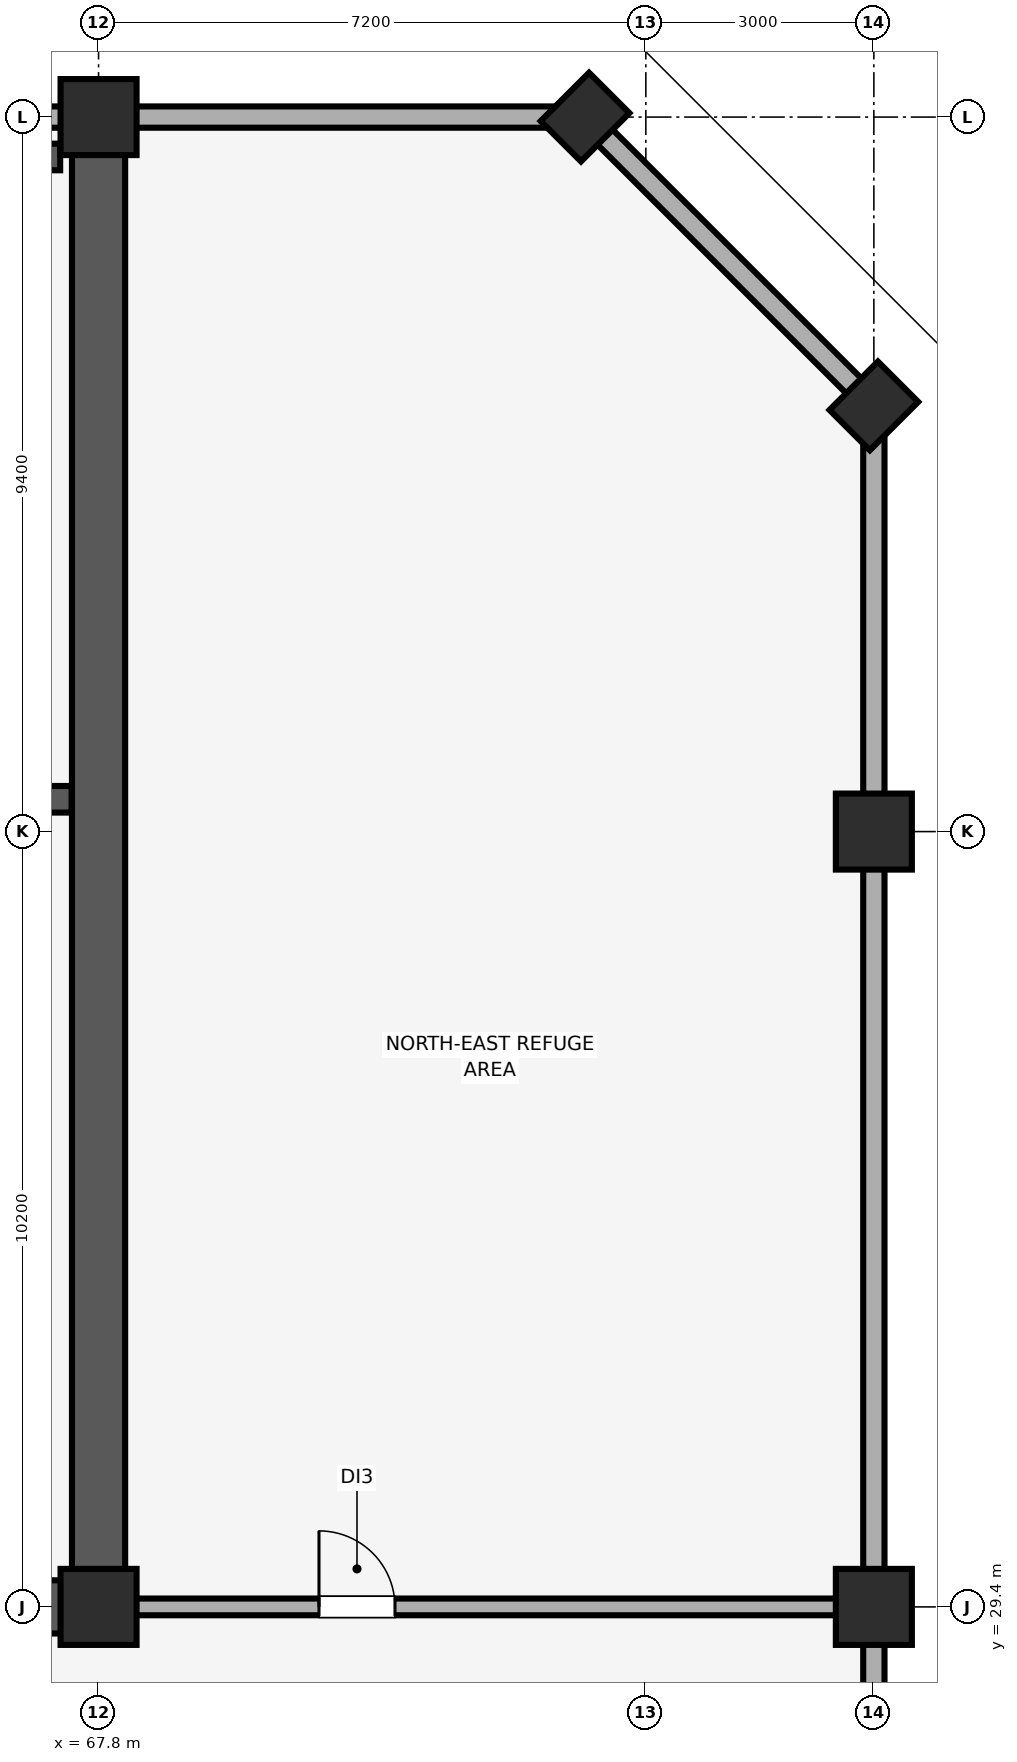
"""IFC4 building model, lengths in metres.
Left out: names, types, materials, properties, quantities, classifications, styles, units other than length and angle.
Written with IfcOpenShell. Run it as: python <this file> out.ifc"""

import sys

from ifc_helpers import new_model, si_unit, direction, frame, frame_2d, origin, origin_2d, place, context, subcontext, project, spatial, rectangle, extrude, element, fill, save


model = new_model("IFC4")
c1 = context("Model", 3, precision=1e-05, world=origin(), true_north=direction((0.0, 1.0)))
c2 = subcontext(c1, "Body", "Model", "MODEL_VIEW")
j1 = project(units=[si_unit("LENGTHUNIT", "METRE"), si_unit("PLANEANGLEUNIT", "RADIAN")], contexts=[c1])
p1 = place(None, origin())
s1 = spatial("IfcSite", under=j1, at=p1, CompositionType="ELEMENT")
p2 = place(p1, origin())
s2 = spatial("IfcBuilding", under=s1, at=p2, CompositionType="ELEMENT")
p3 = place(p2, frame((0.0, 0.0, 280.5)))
s3 = spatial("IfcBuildingStorey", under=s2, at=p3, CompositionType="ELEMENT", Elevation=280.5)
for number, where, z_axis, x_axis in (
    (1, (78.0, 29.4, 0.0), (0.0, 0.0, 1.0), (1.0, 0.0, 0.0)),
    (2, (78.0, 39.6, 0.0), (0.0, 0.0, 1.0), (1.0, 0.0, 0.0)),
):
    element("IfcColumn", number, at=place(p3, frame(where, z_axis=z_axis, x_axis=x_axis)), inside=s3, PredefinedType="COLUMN", context=c2, shape_type="SweptSolid", body=[
        extrude(rectangle(XDim=1.0, YDim=1.0, at=origin_2d()), origin(), (0.0, 0.0, 1.0), 5.1),
    ])
for number, where, z_axis, x_axis in (
    (3, (78.0, 45.2, 0.0), (0.0, 0.0, 1.0), (0.707, 0.707, 0.0)),
    (4, (74.2, 49.0, 0.0), (0.0, 0.0, 1.0), (0.707, 0.707, 0.0)),
):
    element("IfcColumn", number, at=place(p3, frame(where, z_axis=z_axis, x_axis=x_axis)), inside=s3, PredefinedType="PILASTER", context=c2, shape_type="SweptSolid", body=[
        extrude(rectangle(XDim=0.9, YDim=0.75, at=origin_2d()), origin(), (0.0, 0.0, 1.0), 5.1),
    ])
for number, where, z_axis, x_axis in (
    (5, (67.8, 29.4, 0.0), (0.0, 0.0, 1.0), (1.0, 0.0, 0.0)),
    (6, (67.8, 49.0, 0.0), (0.0, 0.0, 1.0), (1.0, 0.0, 0.0)),
):
    element("IfcColumn", number, at=place(p3, frame(where, z_axis=z_axis, x_axis=x_axis)), inside=s3, PredefinedType="COLUMN", context=c2, shape_type="SweptSolid", body=[
        extrude(rectangle(XDim=1.0, YDim=1.0, at=origin_2d()), origin(), (0.0, 0.0, 1.0), 5.1),
    ])
p4 = place(p3, frame((78.0, 9.8, 0.0), z_axis=(0.0, 0.0, 1.0), x_axis=(0.0, 1.0, 0.0)))
e7 = element("IfcWall", 7, at=p4, inside=s3, PredefinedType="SOLIDWALL", context=c2, shape_type="SweptSolid", body=[
    extrude(rectangle(XDim=35.4, YDim=0.28, at=frame_2d((17.7, 0.0))), origin(), (0.0, 0.0, 1.0), 5.1),
])
p5 = place(p3, frame((78.0, 45.2, 0.0), z_axis=(0.0, 0.0, 1.0), x_axis=(-0.707106781187, 0.707106781187, 0.0)))
e8 = element("IfcWall", 8, at=p5, inside=s3, PredefinedType="SOLIDWALL", context=c2, shape_type="SweptSolid", body=[
    extrude(rectangle(XDim=5.374, YDim=0.28, at=frame_2d((2.687, 0.0))), origin(), (0.0, 0.0, 1.0), 5.1),
])
p6 = place(p3, frame((74.2, 49.0, 0.0), z_axis=(0.0, 0.0, 1.0), x_axis=(-1.0, 0.0, 0.0)))
e9 = element("IfcWall", 9, at=p6, inside=s3, PredefinedType="SOLIDWALL", context=c2, shape_type="SweptSolid", body=[
    extrude(rectangle(XDim=64.4, YDim=0.28, at=frame_2d((32.2, 0.0))), origin(), (0.0, 0.0, 1.0), 4.0),
])
p7 = place(p3, frame((67.8, 29.4, 0.0), z_axis=(0.0, 0.0, 1.0), x_axis=(0.0, 1.0, 0.0)))
e10 = element("IfcWall", 10, at=p7, inside=s3, PredefinedType="SHEAR", context=c2, shape_type="SweptSolid", body=[
    extrude(rectangle(XDim=19.2, YDim=0.7, at=frame_2d((9.6, 0.0))), origin(), (0.0, 0.0, 1.0), 5.1),
])
p8 = place(p3, frame((60.4, 29.4, 0.0), z_axis=(0.0, 0.0, 1.0), x_axis=(1.0, 0.0, 0.0)))
e11 = element("IfcWall", 11, at=p8, inside=s3, PredefinedType="SHEAR", context=c2, shape_type="SweptSolid", body=[
    extrude(rectangle(XDim=7.045, YDim=0.7, at=frame_2d((3.522, 0.0))), origin(), (0.0, 0.0, 1.0), 5.1),
])
p9 = place(p3, frame((63.145, 40.025, 0.0), z_axis=(0.0, 0.0, 1.0), x_axis=(1.0, 0.0, 0.0)))
e12 = element("IfcWall", 12, at=p9, inside=s3, PredefinedType="SHEAR", context=c2, shape_type="SweptSolid", body=[
    extrude(rectangle(XDim=4.3, YDim=0.35, at=frame_2d((2.15, 0.0))), origin(), (0.0, 0.0, 1.0), 5.1),
])
p10 = place(p9, frame((1.24, 0.0, 0.0)))
e13 = element("IfcOpeningElement", 13, at=p10, cuts=e12, PredefinedType="OPENING", context=c2, shape_type="SweptSolid", body=[
    extrude(rectangle(XDim=1.15, YDim=2.15, at=frame_2d((0.575, 1.075))), frame((0.0, 0.185, 0.0), z_axis=(0.0, -1.0, 0.0), x_axis=(1.0, 0.0, 0.0)), (0.0, 0.0, 1.0), 0.37),
])
p11 = place(p3, frame((63.145, 48.475, 0.0), z_axis=(0.0, 0.0, 1.0), x_axis=(1.0, 0.0, 0.0)))
e14 = element("IfcWall", 14, at=p11, inside=s3, PredefinedType="SHEAR", context=c2, shape_type="SweptSolid", body=[
    extrude(rectangle(XDim=4.15, YDim=0.35, at=frame_2d((2.075, 0.0))), origin(), (0.0, 0.0, 1.0), 5.1),
])
p12 = place(p3, frame((68.2, 29.4, 0.0), z_axis=(0.0, 0.0, 1.0), x_axis=(1.0, 0.0, 0.0)))
e15 = element("IfcWall", 15, at=p12, inside=s3, PredefinedType="PARTITIONING", context=c2, shape_type="SweptSolid", body=[
    extrude(rectangle(XDim=9.65, YDim=0.22, at=frame_2d((4.825, 0.0))), origin(), (0.0, 0.0, 1.0), 4.0),
])
p13 = place(p12, frame((2.5, 0.0, 0.0)))
e16 = element("IfcOpeningElement", 16, at=p13, cuts=e15, PredefinedType="OPENING", context=c2, shape_type="SweptSolid", body=[
    extrude(rectangle(XDim=1.0, YDim=2.15, at=frame_2d((0.5, 1.075))), frame((0.0, 0.12, 0.0), z_axis=(0.0, -1.0, 0.0), x_axis=(1.0, 0.0, 0.0)), (0.0, 0.0, 1.0), 0.24),
])
p14 = place(p13, origin())
e17 = element("IfcDoor", 17, at=p14, inside=s3, OperationType="SINGLE_SWING_LEFT", PredefinedType="DOOR", context=c2, shape_type="SweptSolid", body=[
    extrude(rectangle(XDim=1.0, YDim=2.15, at=frame_2d((0.5, 1.075))), frame((0.0, 0.025, 0.0), z_axis=(0.0, -1.0, 0.0), x_axis=(1.0, 0.0, 0.0)), (0.0, 0.0, 1.0), 0.05),
])
fill(e16, e17)
save(model, sys.argv[1])
